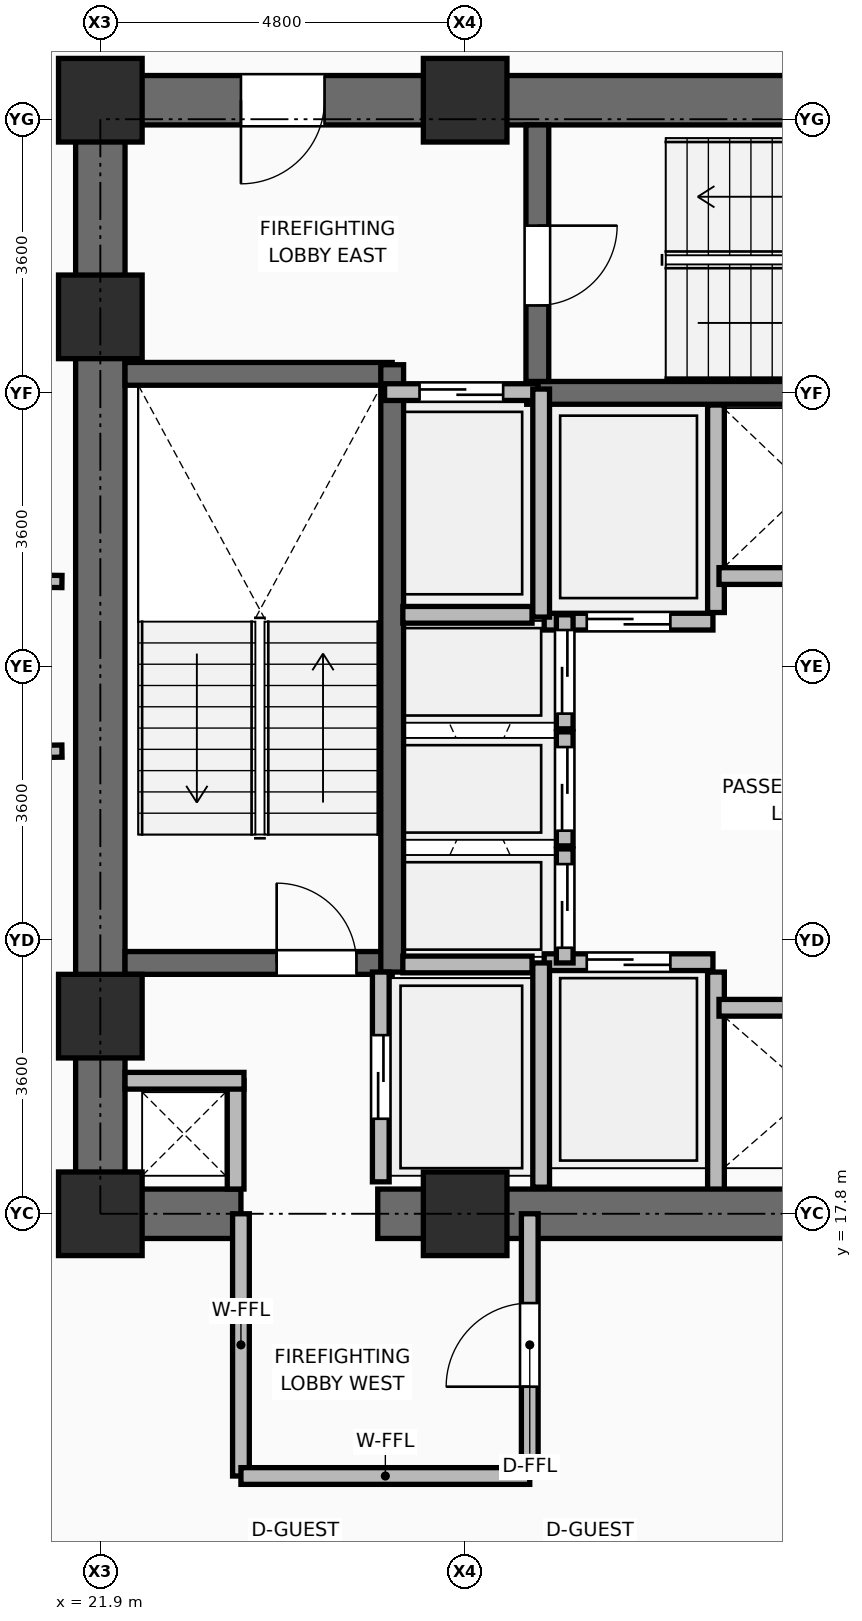
"""IFC4 building model, lengths in metres.
Left out: names, types, materials, properties, quantities, classifications, styles, units other than length and angle.
Written with IfcOpenShell. Run it as: python <this file> out.ifc"""

import sys

from ifc_helpers import new_model, si_unit, direction, frame, frame_2d, origin, origin_2d, place, context, subcontext, project, spatial, rectangle, extrude, element, fill, save


model = new_model("IFC4")
c1 = context("Model", 3, precision=1e-05, world=origin(), true_north=direction((0.0, 1.0)))
c2 = subcontext(c1, "Body", "Model", "MODEL_VIEW")
j1 = project(units=[si_unit("LENGTHUNIT", "METRE"), si_unit("PLANEANGLEUNIT", "RADIAN")], contexts=[c1])
p1 = place(None, origin())
s1 = spatial("IfcSite", under=j1, at=p1, CompositionType="ELEMENT")
p2 = place(p1, origin())
s2 = spatial("IfcBuilding", under=s1, at=p2, CompositionType="ELEMENT")
p3 = place(p2, frame((0.0, 0.0, 83.25)))
s3 = spatial("IfcBuildingStorey", under=s2, at=p3, CompositionType="ELEMENT", Elevation=83.25)
for number, where, z_axis, x_axis in (
    (1, (21.9, 17.8, 0.0), (0.0, 0.0, 1.0), (1.0, 0.0, 0.0)),
    (2, (26.7, 17.8, 0.0), (0.0, 0.0, 1.0), (1.0, 0.0, 0.0)),
    (3, (21.9, 20.4, 0.0), (0.0, 0.0, 1.0), (1.0, 0.0, 0.0)),
    (4, (21.9, 29.6, 0.0), (0.0, 0.0, 1.0), (1.0, 0.0, 0.0)),
    (5, (21.9, 32.45, 0.0), (0.0, 0.0, 1.0), (1.0, 0.0, 0.0)),
    (6, (26.7, 32.45, 0.0), (0.0, 0.0, 1.0), (1.0, 0.0, 0.0)),
):
    element("IfcColumn", number, at=place(p3, frame(where, z_axis=z_axis, x_axis=x_axis)), inside=s3, PredefinedType="COLUMN", context=c2, shape_type="SweptSolid", body=[
        extrude(rectangle(XDim=1.1, YDim=1.1, at=origin_2d()), origin(), (0.0, 0.0, 1.0), 3.75),
    ])
p4 = place(p3, frame((30.0, 18.08, 0.0), z_axis=(0.0, 0.0, 1.0), x_axis=(0.0, 1.0, 0.0)))
e7 = element("IfcWall", 7, at=p4, inside=s3, PredefinedType="PARTITIONING", context=c2, shape_type="SweptSolid", body=[
    extrude(rectangle(XDim=2.9, YDim=0.22, at=frame_2d((1.45, 0.0))), origin(), (0.0, 0.0, 1.0), 3.545),
])
p5 = place(p3, frame((30.0, 25.71, 0.0), z_axis=(0.0, 0.0, 1.0), x_axis=(0.0, 1.0, 0.0)))
e8 = element("IfcWall", 8, at=p5, inside=s3, PredefinedType="PARTITIONING", context=c2, shape_type="SweptSolid", body=[
    extrude(rectangle(XDim=2.73, YDim=0.22, at=frame_2d((1.365, 0.0))), origin(), (0.0, 0.0, 1.0), 3.545),
])
p6 = place(p3, frame((21.575, 17.8, 0.0), z_axis=(0.0, 0.0, 1.0), x_axis=(1.0, 0.0, 0.0)))
e9 = element("IfcWall", 9, at=p6, inside=s3, PredefinedType="SHEAR", context=c2, shape_type="SweptSolid", body=[
    extrude(rectangle(XDim=2.175, YDim=0.65, at=frame_2d((1.087, 0.0))), origin(), (0.0, 0.0, 1.0), 3.57),
])
p7 = place(p3, frame((25.55, 17.8, 0.0), z_axis=(0.0, 0.0, 1.0), x_axis=(1.0, 0.0, 0.0)))
e10 = element("IfcWall", 10, at=p7, inside=s3, PredefinedType="SHEAR", context=c2, shape_type="SweptSolid", body=[
    extrude(rectangle(XDim=6.9, YDim=0.65, at=frame_2d((3.45, 0.0))), origin(), (0.0, 0.0, 1.0), 3.57),
])
p8 = place(p3, frame((21.575, 32.45, 0.0), z_axis=(0.0, 0.0, 1.0), x_axis=(1.0, 0.0, 0.0)))
e11 = element("IfcWall", 11, at=p8, inside=s3, PredefinedType="SHEAR", context=c2, shape_type="SweptSolid", body=[
    extrude(rectangle(XDim=19.85, YDim=0.65, at=frame_2d((9.925, 0.0))), origin(), (0.0, 0.0, 1.0), 3.57),
])
p9 = place(p8, frame((2.175, 0.0, 0.0)))
e12 = element("IfcOpeningElement", 12, at=p9, cuts=e11, PredefinedType="OPENING", context=c2, shape_type="SweptSolid", body=[
    extrude(rectangle(XDim=1.1, YDim=2.1, at=frame_2d((0.55, 1.05))), frame((0.0, 0.335, 0.0), z_axis=(0.0, -1.0, 0.0), x_axis=(1.0, 0.0, 0.0)), (0.0, 0.0, 1.0), 0.67),
])
p10 = place(p8, frame((15.565, 0.0, 0.0)))
e13 = element("IfcOpeningElement", 13, at=p10, cuts=e11, PredefinedType="OPENING", context=c2, shape_type="SweptSolid", body=[
    extrude(rectangle(XDim=1.0, YDim=2.1, at=frame_2d((0.5, 1.05))), frame((0.0, 0.335, 0.0), z_axis=(0.0, -1.0, 0.0), x_axis=(1.0, 0.0, 0.0)), (0.0, 0.0, 1.0), 0.67),
])
p11 = place(p8, frame((17.575, 0.0, 0.0)))
e14 = element("IfcOpeningElement", 14, at=p11, cuts=e11, PredefinedType="OPENING", context=c2, shape_type="SweptSolid", body=[
    extrude(rectangle(XDim=0.9, YDim=2.1, at=frame_2d((0.45, 1.05))), frame((0.0, 0.335, 0.0), z_axis=(0.0, -1.0, 0.0), x_axis=(1.0, 0.0, 0.0)), (0.0, 0.0, 1.0), 0.67),
])
p12 = place(p3, frame((21.9, 18.125, 0.0), z_axis=(0.0, 0.0, 1.0), x_axis=(0.0, 1.0, 0.0)))
e15 = element("IfcWall", 15, at=p12, inside=s3, PredefinedType="SHEAR", context=c2, shape_type="SweptSolid", body=[
    extrude(rectangle(XDim=14.0, YDim=0.65, at=frame_2d((7.0, 0.0))), origin(), (0.0, 0.0, 1.0), 3.57),
])
p13 = place(p3, frame((22.225, 21.1, 0.0), z_axis=(0.0, 0.0, 1.0), x_axis=(1.0, 0.0, 0.0)))
e16 = element("IfcWall", 16, at=p13, inside=s3, PredefinedType="SHEAR", context=c2, shape_type="SweptSolid", body=[
    extrude(rectangle(XDim=3.515, YDim=0.3, at=frame_2d((1.757, 0.0))), origin(), (0.0, 0.0, 1.0), 3.57),
])
p14 = place(p13, frame((1.995, 0.0, 0.0)))
e17 = element("IfcOpeningElement", 17, at=p14, cuts=e16, PredefinedType="OPENING", context=c2, shape_type="SweptSolid", body=[
    extrude(rectangle(XDim=1.05, YDim=2.1, at=frame_2d((0.525, 1.05))), frame((0.0, 0.16, 0.0), z_axis=(0.0, -1.0, 0.0), x_axis=(1.0, 0.0, 0.0)), (0.0, 0.0, 1.0), 0.32),
])
p15 = place(p3, frame((22.225, 28.85, 0.0), z_axis=(0.0, 0.0, 1.0), x_axis=(1.0, 0.0, 0.0)))
e18 = element("IfcWall", 18, at=p15, inside=s3, PredefinedType="SHEAR", context=c2, shape_type="SweptSolid", body=[
    extrude(rectangle(XDim=3.515, YDim=0.3, at=frame_2d((1.757, 0.0))), origin(), (0.0, 0.0, 1.0), 3.57),
])
p16 = place(p3, frame((25.74, 20.98, 0.0), z_axis=(0.0, 0.0, 1.0), x_axis=(0.0, 1.0, 0.0)))
e19 = element("IfcWall", 19, at=p16, inside=s3, PredefinedType="SHEAR", context=c2, shape_type="SweptSolid", body=[
    extrude(rectangle(XDim=7.99, YDim=0.3, at=frame_2d((3.995, 0.0))), origin(), (0.0, 0.0, 1.0), 3.57),
])
p17 = place(p3, frame((27.51, 28.6, 0.0), z_axis=(0.0, 0.0, 1.0), x_axis=(1.0, 0.0, 0.0)))
e20 = element("IfcWall", 20, at=p17, inside=s3, PredefinedType="SHEAR", context=c2, shape_type="SweptSolid", body=[
    extrude(rectangle(XDim=8.03, YDim=0.3, at=frame_2d((4.015, 0.0))), origin(), (0.0, 0.0, 1.0), 3.57),
])
p18 = place(p3, frame((27.65, 28.75, 0.0), z_axis=(0.0, 0.0, 1.0), x_axis=(0.0, 1.0, 0.0)))
e21 = element("IfcWall", 21, at=p18, inside=s3, PredefinedType="SHEAR", context=c2, shape_type="SweptSolid", body=[
    extrude(rectangle(XDim=3.375, YDim=0.3, at=frame_2d((1.688, 0.0))), origin(), (0.0, 0.0, 1.0), 3.57),
])
p19 = place(p18, frame((1.0, 0.0, 0.0)))
e22 = element("IfcOpeningElement", 22, at=p19, cuts=e21, PredefinedType="OPENING", context=c2, shape_type="SweptSolid", body=[
    extrude(rectangle(XDim=1.05, YDim=2.1, at=frame_2d((0.525, 1.05))), frame((0.0, 0.16, 0.0), z_axis=(0.0, -1.0, 0.0), x_axis=(1.0, 0.0, 0.0)), (0.0, 0.0, 1.0), 0.32),
])
p20 = place(p3, frame((23.68, 18.125, 0.0), z_axis=(0.0, 0.0, 1.0), x_axis=(0.0, 1.0, 0.0)))
e23 = element("IfcWall", 23, at=p20, inside=s3, PredefinedType="PARTITIONING", context=c2, shape_type="SweptSolid", body=[
    extrude(rectangle(XDim=1.425, YDim=0.22, at=frame_2d((0.712, 0.0))), origin(), (0.0, 0.0, 1.0), 3.55),
])
p21 = place(p3, frame((22.225, 19.55, 0.0), z_axis=(0.0, 0.0, 1.0), x_axis=(1.0, 0.0, 0.0)))
e24 = element("IfcWall", 24, at=p21, inside=s3, PredefinedType="PARTITIONING", context=c2, shape_type="SweptSolid", body=[
    extrude(rectangle(XDim=1.565, YDim=0.22, at=frame_2d((0.782, 0.0))), origin(), (0.0, 0.0, 1.0), 2.595),
])
p22 = place(p3, frame((25.59, 18.22, 0.0), z_axis=(0.0, 0.0, 1.0), x_axis=(0.0, 1.0, 0.0)))
e25 = element("IfcWall", 25, at=p22, inside=s3, PredefinedType="PARTITIONING", context=c2, shape_type="SweptSolid", body=[
    extrude(rectangle(XDim=2.76, YDim=0.22, at=frame_2d((1.38, 0.0))), origin(), (0.0, 0.0, 1.0), 3.55),
])
p23 = place(p22, frame((0.83, 0.0, 0.0)))
e26 = element("IfcOpeningElement", 26, at=p23, cuts=e25, PredefinedType="OPENING", context=c2, shape_type="SweptSolid", body=[
    extrude(rectangle(XDim=1.1, YDim=2.2, at=frame_2d((0.55, 1.1))), frame((0.0, 0.12, 0.0), z_axis=(0.0, -1.0, 0.0), x_axis=(1.0, 0.0, 0.0)), (0.0, 0.0, 1.0), 0.24),
])
p24 = place(p3, frame((25.64, 28.61, 0.0), z_axis=(0.0, 0.0, 1.0), x_axis=(1.0, 0.0, 0.0)))
e27 = element("IfcWall", 27, at=p24, inside=s3, PredefinedType="PARTITIONING", context=c2, shape_type="SweptSolid", body=[
    extrude(rectangle(XDim=2.02, YDim=0.22, at=frame_2d((1.01, 0.0))), origin(), (0.0, 0.0, 1.0), 3.55),
])
p25 = place(p24, frame((0.46, 0.0, 0.0)))
e28 = element("IfcOpeningElement", 28, at=p25, cuts=e27, PredefinedType="OPENING", context=c2, shape_type="SweptSolid", body=[
    extrude(rectangle(XDim=1.1, YDim=2.2, at=frame_2d((0.55, 1.1))), frame((0.0, 0.12, 0.0), z_axis=(0.0, -1.0, 0.0), x_axis=(1.0, 0.0, 0.0)), (0.0, 0.0, 1.0), 0.24),
])
p26 = place(p3, frame((27.74, 21.11, 0.0), z_axis=(0.0, 0.0, 1.0), x_axis=(1.0, 0.0, 0.0)))
e29 = element("IfcWall", 29, at=p26, inside=s3, PredefinedType="PARTITIONING", context=c2, shape_type="SweptSolid", body=[
    extrude(rectangle(XDim=2.22, YDim=0.22, at=frame_2d((1.11, 0.0))), origin(), (0.0, 0.0, 1.0), 3.55),
])
p27 = place(p26, frame((0.56, 0.0, 0.0)))
e30 = element("IfcOpeningElement", 30, at=p27, cuts=e29, PredefinedType="OPENING", context=c2, shape_type="SweptSolid", body=[
    extrude(rectangle(XDim=1.1, YDim=2.2, at=frame_2d((0.55, 1.1))), frame((0.0, 0.12, 0.0), z_axis=(0.0, -1.0, 0.0), x_axis=(1.0, 0.0, 0.0)), (0.0, 0.0, 1.0), 0.24),
])
p28 = place(p3, frame((27.74, 25.59, 0.0), z_axis=(0.0, 0.0, 1.0), x_axis=(1.0, 0.0, 0.0)))
e31 = element("IfcWall", 31, at=p28, inside=s3, PredefinedType="PARTITIONING", context=c2, shape_type="SweptSolid", body=[
    extrude(rectangle(XDim=2.22, YDim=0.22, at=frame_2d((1.11, 0.0))), origin(), (0.0, 0.0, 1.0), 3.55),
])
p29 = place(p28, frame((0.56, 0.0, 0.0)))
e32 = element("IfcOpeningElement", 32, at=p29, cuts=e31, PredefinedType="OPENING", context=c2, shape_type="SweptSolid", body=[
    extrude(rectangle(XDim=1.1, YDim=2.2, at=frame_2d((0.55, 1.1))), frame((0.0, 0.12, 0.0), z_axis=(0.0, -1.0, 0.0), x_axis=(1.0, 0.0, 0.0)), (0.0, 0.0, 1.0), 0.24),
])
p30 = place(p3, frame((30.04, 20.51, 0.0), z_axis=(0.0, 0.0, 1.0), x_axis=(1.0, 0.0, 0.0)))
e33 = element("IfcWall", 33, at=p30, inside=s3, PredefinedType="PARTITIONING", context=c2, shape_type="SweptSolid", body=[
    extrude(rectangle(XDim=2.42, YDim=0.22, at=frame_2d((1.21, 0.0))), origin(), (0.0, 0.0, 1.0), 3.55),
])
p31 = place(p3, frame((30.04, 26.19, 0.0), z_axis=(0.0, 0.0, 1.0), x_axis=(1.0, 0.0, 0.0)))
e34 = element("IfcWall", 34, at=p31, inside=s3, PredefinedType="PARTITIONING", context=c2, shape_type="SweptSolid", body=[
    extrude(rectangle(XDim=2.32, YDim=0.22, at=frame_2d((1.16, 0.0))), origin(), (0.0, 0.0, 1.0), 3.55),
])
p32 = place(p3, frame((28.01, 21.1, 0.0), z_axis=(0.0, 0.0, 1.0), x_axis=(0.0, 1.0, 0.0)))
e35 = element("IfcWall", 35, at=p32, inside=s3, PredefinedType="PARTITIONING", context=c2, shape_type="SweptSolid", body=[
    extrude(rectangle(XDim=1.5, YDim=0.22, at=frame_2d((0.75, 0.0))), origin(), (0.0, 0.0, 1.0), 3.55),
])
p33 = place(p32, frame((0.2, 0.0, 0.0)))
e36 = element("IfcOpeningElement", 36, at=p33, cuts=e35, PredefinedType="OPENING", context=c2, shape_type="SweptSolid", body=[
    extrude(rectangle(XDim=1.1, YDim=2.2, at=frame_2d((0.55, 1.1))), frame((0.0, 0.12, 0.0), z_axis=(0.0, -1.0, 0.0), x_axis=(1.0, 0.0, 0.0)), (0.0, 0.0, 1.0), 0.24),
])
p34 = place(p3, frame((28.01, 22.64, 0.0), z_axis=(0.0, 0.0, 1.0), x_axis=(0.0, 1.0, 0.0)))
e37 = element("IfcWall", 37, at=p34, inside=s3, PredefinedType="PARTITIONING", context=c2, shape_type="SweptSolid", body=[
    extrude(rectangle(XDim=1.5, YDim=0.22, at=frame_2d((0.75, 0.0))), origin(), (0.0, 0.0, 1.0), 3.55),
])
p35 = place(p34, frame((0.2, 0.0, 0.0)))
e38 = element("IfcOpeningElement", 38, at=p35, cuts=e37, PredefinedType="OPENING", context=c2, shape_type="SweptSolid", body=[
    extrude(rectangle(XDim=1.1, YDim=2.2, at=frame_2d((0.55, 1.1))), frame((0.0, 0.12, 0.0), z_axis=(0.0, -1.0, 0.0), x_axis=(1.0, 0.0, 0.0)), (0.0, 0.0, 1.0), 0.24),
])
p36 = place(p3, frame((28.01, 24.18, 0.0), z_axis=(0.0, 0.0, 1.0), x_axis=(0.0, 1.0, 0.0)))
e39 = element("IfcWall", 39, at=p36, inside=s3, PredefinedType="PARTITIONING", context=c2, shape_type="SweptSolid", body=[
    extrude(rectangle(XDim=1.5, YDim=0.22, at=frame_2d((0.75, 0.0))), origin(), (0.0, 0.0, 1.0), 3.55),
])
p37 = place(p36, frame((0.2, 0.0, 0.0)))
e40 = element("IfcOpeningElement", 40, at=p37, cuts=e39, PredefinedType="OPENING", context=c2, shape_type="SweptSolid", body=[
    extrude(rectangle(XDim=1.1, YDim=2.2, at=frame_2d((0.55, 1.1))), frame((0.0, 0.12, 0.0), z_axis=(0.0, -1.0, 0.0), x_axis=(1.0, 0.0, 0.0)), (0.0, 0.0, 1.0), 0.24),
])
p38 = place(p3, frame((27.7, 18.15, 0.0), z_axis=(0.0, 0.0, 1.0), x_axis=(0.0, 1.0, 0.0)))
e41 = element("IfcWall", 41, at=p38, inside=s3, PredefinedType="PARTITIONING", context=c2, shape_type="SweptSolid", body=[
    extrude(rectangle(XDim=2.95, YDim=0.22, at=frame_2d((1.475, 0.0))), origin(), (0.0, 0.0, 1.0), 3.55),
])
p39 = place(p3, frame((27.7, 25.65, 0.0), z_axis=(0.0, 0.0, 1.0), x_axis=(0.0, 1.0, 0.0)))
e42 = element("IfcWall", 42, at=p39, inside=s3, PredefinedType="PARTITIONING", context=c2, shape_type="SweptSolid", body=[
    extrude(rectangle(XDim=3.0, YDim=0.22, at=frame_2d((1.5, 0.0))), origin(), (0.0, 0.0, 1.0), 3.55),
])
for number, where, z_axis, x_axis in (
    (43, (25.88, 21.08, 0.0), (0.0, 0.0, 1.0), (1.0, 0.0, 0.0)),
    (44, (25.88, 25.68, 0.0), (0.0, 0.0, 1.0), (1.0, 0.0, 0.0)),
):
    element("IfcWall", number, at=place(p3, frame(where, z_axis=z_axis, x_axis=x_axis)), inside=s3, PredefinedType="PARTITIONING", context=c2, shape_type="SweptSolid", body=[
        extrude(rectangle(XDim=1.7, YDim=0.22, at=frame_2d((0.85, 0.0))), origin(), (0.0, 0.0, 1.0), 3.55),
    ])
p40 = place(p3, frame((23.75, 14.35, 0.0), z_axis=(0.0, 0.0, 1.0), x_axis=(0.0, 1.0, 0.0)))
e45 = element("IfcWall", 45, at=p40, inside=s3, PredefinedType="PARTITIONING", context=c2, shape_type="SweptSolid", body=[
    extrude(rectangle(XDim=3.45, YDim=0.22, at=frame_2d((1.725, 0.0))), origin(), (0.0, 0.0, 1.0), 2.928),
])
p41 = place(p3, frame((23.75, 14.35, 0.0), z_axis=(0.0, 0.0, 1.0), x_axis=(1.0, 0.0, 0.0)))
e46 = element("IfcWall", 46, at=p41, inside=s3, PredefinedType="PARTITIONING", context=c2, shape_type="SweptSolid", body=[
    extrude(rectangle(XDim=3.8, YDim=0.22, at=frame_2d((1.9, 0.0))), origin(), (0.0, 0.0, 1.0), 3.55),
])
p42 = place(p3, frame((27.55, 14.35, 0.0), z_axis=(0.0, 0.0, 1.0), x_axis=(0.0, 1.0, 0.0)))
e47 = element("IfcWall", 47, at=p42, inside=s3, PredefinedType="PARTITIONING", context=c2, shape_type="SweptSolid", body=[
    extrude(rectangle(XDim=3.45, YDim=0.22, at=frame_2d((1.725, 0.0))), origin(), (0.0, 0.0, 1.0), 2.928),
])
p43 = place(p42, frame((1.175, 0.0, 0.0)))
e48 = element("IfcOpeningElement", 48, at=p43, cuts=e47, PredefinedType="OPENING", context=c2, shape_type="SweptSolid", body=[
    extrude(rectangle(XDim=1.1, YDim=2.1, at=frame_2d((0.55, 1.05))), frame((0.0, 0.12, 0.0), z_axis=(0.0, -1.0, 0.0), x_axis=(1.0, 0.0, 0.0)), (0.0, 0.0, 1.0), 0.24),
])
p44 = place(p3, frame((21.395, 26.118, 0.0), z_axis=(0.0, 0.0, 1.0), x_axis=(-0.999930307049, 0.011805975003, 0.0)))
e49 = element("IfcWall", 49, at=p44, inside=s3, PredefinedType="PARTITIONING", context=c2, shape_type="SweptSolid", body=[
    extrude(rectangle(XDim=2.047, YDim=0.16, at=frame_2d((1.024, 0.0))), origin(), (0.0, 0.0, 1.0), 3.55),
])
p45 = place(p44, frame((0.16, 0.0, 0.0)))
e50 = element("IfcOpeningElement", 50, at=p45, cuts=e49, PredefinedType="OPENING", context=c2, shape_type="SweptSolid", body=[
    extrude(rectangle(XDim=1.2, YDim=2.1, at=frame_2d((0.6, 1.05))), frame((0.0, 0.09, 0.0), z_axis=(0.0, -1.0, 0.0), x_axis=(1.0, 0.0, 0.0)), (0.0, 0.0, 1.0), 0.18),
])
p46 = place(p3, frame((19.348, 23.858, 0.0), z_axis=(0.0, 0.0, 1.0), x_axis=(0.999899308643, 0.014190580528, 0.0)))
e51 = element("IfcWall", 51, at=p46, inside=s3, PredefinedType="PARTITIONING", context=c2, shape_type="SweptSolid", body=[
    extrude(rectangle(XDim=2.047, YDim=0.16, at=frame_2d((1.024, 0.0))), origin(), (0.0, 0.0, 1.0), 3.55),
])
p47 = place(p14, origin())
e52 = element("IfcDoor", 52, at=p47, inside=s3, OperationType="SINGLE_SWING_LEFT", PredefinedType="DOOR", context=c2, shape_type="SweptSolid", body=[
    extrude(rectangle(XDim=1.05, YDim=2.1, at=frame_2d((0.525, 1.05))), frame((0.0, 0.025, 0.0), z_axis=(0.0, -1.0, 0.0), x_axis=(1.0, 0.0, 0.0)), (0.0, 0.0, 1.0), 0.05),
])
fill(e17, e52)
p48 = place(p19, frame((1.05, 0.0, 0.0), z_axis=(0.0, 0.0, 1.0), x_axis=(-1.0, 0.0, 0.0)))
e53 = element("IfcDoor", 53, at=p48, inside=s3, OperationType="SINGLE_SWING_LEFT", PredefinedType="DOOR", context=c2, shape_type="SweptSolid", body=[
    extrude(rectangle(XDim=1.05, YDim=2.1, at=frame_2d((0.525, 1.05))), frame((0.0, 0.025, 0.0), z_axis=(0.0, -1.0, 0.0), x_axis=(1.0, 0.0, 0.0)), (0.0, 0.0, 1.0), 0.05),
])
fill(e22, e53)
p49 = place(p23, origin())
e54 = element("IfcDoor", 54, at=p49, inside=s3, OperationType="DOUBLE_DOOR_SLIDING", PredefinedType="DOOR", context=c2, shape_type="SweptSolid", body=[
    extrude(rectangle(XDim=1.1, YDim=2.2, at=frame_2d((0.55, 1.1))), frame((0.0, 0.025, 0.0), z_axis=(0.0, -1.0, 0.0), x_axis=(1.0, 0.0, 0.0)), (0.0, 0.0, 1.0), 0.05),
])
fill(e26, e54)
p50 = place(p25, origin())
e55 = element("IfcDoor", 55, at=p50, inside=s3, OperationType="DOUBLE_DOOR_SLIDING", PredefinedType="DOOR", context=c2, shape_type="SweptSolid", body=[
    extrude(rectangle(XDim=1.1, YDim=2.2, at=frame_2d((0.55, 1.1))), frame((0.0, 0.025, 0.0), z_axis=(0.0, -1.0, 0.0), x_axis=(1.0, 0.0, 0.0)), (0.0, 0.0, 1.0), 0.05),
])
fill(e28, e55)
p51 = place(p27, origin())
e56 = element("IfcDoor", 56, at=p51, inside=s3, OperationType="DOUBLE_DOOR_SLIDING", PredefinedType="DOOR", context=c2, shape_type="SweptSolid", body=[
    extrude(rectangle(XDim=1.1, YDim=2.2, at=frame_2d((0.55, 1.1))), frame((0.0, 0.025, 0.0), z_axis=(0.0, -1.0, 0.0), x_axis=(1.0, 0.0, 0.0)), (0.0, 0.0, 1.0), 0.05),
])
fill(e30, e56)
p52 = place(p29, frame((1.1, 0.0, 0.0), z_axis=(0.0, 0.0, 1.0), x_axis=(-1.0, 0.0, 0.0)))
e57 = element("IfcDoor", 57, at=p52, inside=s3, OperationType="DOUBLE_DOOR_SLIDING", PredefinedType="DOOR", context=c2, shape_type="SweptSolid", body=[
    extrude(rectangle(XDim=1.1, YDim=2.2, at=frame_2d((0.55, 1.1))), frame((0.0, 0.025, 0.0), z_axis=(0.0, -1.0, 0.0), x_axis=(1.0, 0.0, 0.0)), (0.0, 0.0, 1.0), 0.05),
])
fill(e32, e57)
p53 = place(p33, frame((1.1, 0.0, 0.0), z_axis=(0.0, 0.0, 1.0), x_axis=(-1.0, 0.0, 0.0)))
e58 = element("IfcDoor", 58, at=p53, inside=s3, OperationType="DOUBLE_DOOR_SLIDING", PredefinedType="DOOR", context=c2, shape_type="SweptSolid", body=[
    extrude(rectangle(XDim=1.1, YDim=2.2, at=frame_2d((0.55, 1.1))), frame((0.0, 0.025, 0.0), z_axis=(0.0, -1.0, 0.0), x_axis=(1.0, 0.0, 0.0)), (0.0, 0.0, 1.0), 0.05),
])
fill(e36, e58)
p54 = place(p35, frame((1.1, 0.0, 0.0), z_axis=(0.0, 0.0, 1.0), x_axis=(-1.0, 0.0, 0.0)))
e59 = element("IfcDoor", 59, at=p54, inside=s3, OperationType="DOUBLE_DOOR_SLIDING", PredefinedType="DOOR", context=c2, shape_type="SweptSolid", body=[
    extrude(rectangle(XDim=1.1, YDim=2.2, at=frame_2d((0.55, 1.1))), frame((0.0, 0.025, 0.0), z_axis=(0.0, -1.0, 0.0), x_axis=(1.0, 0.0, 0.0)), (0.0, 0.0, 1.0), 0.05),
])
fill(e38, e59)
p55 = place(p37, frame((1.1, 0.0, 0.0), z_axis=(0.0, 0.0, 1.0), x_axis=(-1.0, 0.0, 0.0)))
e60 = element("IfcDoor", 60, at=p55, inside=s3, OperationType="DOUBLE_DOOR_SLIDING", PredefinedType="DOOR", context=c2, shape_type="SweptSolid", body=[
    extrude(rectangle(XDim=1.1, YDim=2.2, at=frame_2d((0.55, 1.1))), frame((0.0, 0.025, 0.0), z_axis=(0.0, -1.0, 0.0), x_axis=(1.0, 0.0, 0.0)), (0.0, 0.0, 1.0), 0.05),
])
fill(e40, e60)
p56 = place(p43, origin())
e61 = element("IfcDoor", 61, at=p56, inside=s3, OperationType="SINGLE_SWING_LEFT", PredefinedType="DOOR", context=c2, shape_type="SweptSolid", body=[
    extrude(rectangle(XDim=1.1, YDim=2.1, at=frame_2d((0.55, 1.05))), frame((0.0, 0.025, 0.0), z_axis=(0.0, -1.0, 0.0), x_axis=(1.0, 0.0, 0.0)), (0.0, 0.0, 1.0), 0.05),
])
fill(e48, e61)
p57 = place(p9, frame((1.1, 0.0, 0.0), z_axis=(0.0, 0.0, 1.0), x_axis=(-1.0, 0.0, 0.0)))
e62 = element("IfcDoor", 62, at=p57, inside=s3, OperationType="SINGLE_SWING_RIGHT", PredefinedType="DOOR", context=c2, shape_type="SweptSolid", body=[
    extrude(rectangle(XDim=1.1, YDim=2.1, at=frame_2d((0.55, 1.05))), frame((0.0, 0.025, 0.0), z_axis=(0.0, -1.0, 0.0), x_axis=(1.0, 0.0, 0.0)), (0.0, 0.0, 1.0), 0.05),
])
fill(e12, e62)
save(model, sys.argv[1])
